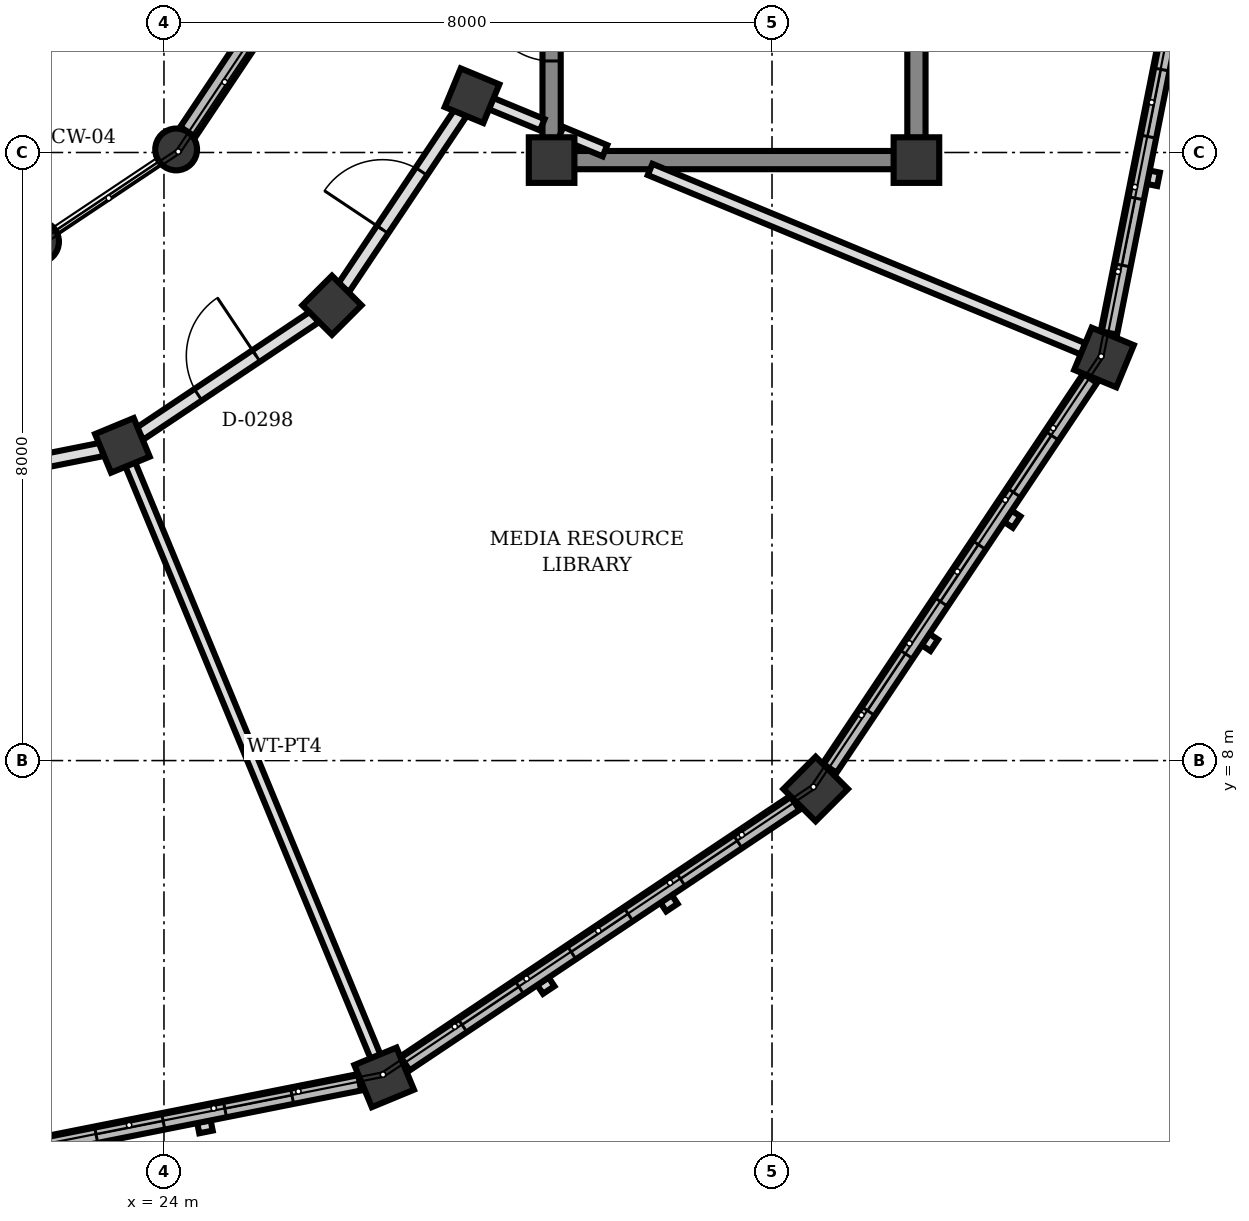
"""IFC4 building model, lengths in metres.
Left out: names, types, materials, properties, quantities, classifications, styles, units other than length and angle.
Written with IfcOpenShell. Run it as: python <this file> out.ifc"""

import sys

from ifc_helpers import new_model, si_unit, direction, frame, frame_2d, origin, origin_2d, place, context, subcontext, project, spatial, rectangle, circle, extrude, element, fill, save


model = new_model("IFC4")
c1 = context("Model", 3, precision=1e-05, world=origin(), true_north=direction((0.0, 1.0)))
c2 = subcontext(c1, "Body", "Model", "MODEL_VIEW")
j1 = project(units=[si_unit("LENGTHUNIT", "METRE"), si_unit("PLANEANGLEUNIT", "RADIAN")], contexts=[c1])
p1 = place(None, origin())
s1 = spatial("IfcSite", under=j1, at=p1, CompositionType="ELEMENT")
p2 = place(p1, origin())
s2 = spatial("IfcBuilding", under=s1, at=p2, CompositionType="ELEMENT")
p3 = place(p2, frame((0.0, 0.0, 4.5)))
s3 = spatial("IfcBuildingStorey", under=s2, at=p3, CompositionType="ELEMENT", Elevation=4.5)
for number, where, z_axis, x_axis in (
    (1, (29.1, 15.9, 0.0), (0.0, 0.0, 1.0), (1.0, 0.0, 0.0)),
    (2, (33.9, 15.9, 0.0), (0.0, 0.0, 1.0), (1.0, 0.0, 0.0)),
):
    element("IfcColumn", number, at=place(p3, frame(where, z_axis=z_axis, x_axis=x_axis)), inside=s3, PredefinedType="COLUMN", context=c2, shape_type="SweptSolid", body=[
        extrude(rectangle(XDim=0.6, YDim=0.6, at=origin_2d()), origin(), (0.0, 0.0, 1.0), 4.0),
    ])
for number, where, z_axis, x_axis in (
    (3, (22.343, 14.826, 0.0), (0.0, 0.0, 1.0), (1.0, 0.0, 0.0)),
    (4, (24.16, 16.04, 0.0), (0.0, 0.0, 1.0), (1.0, 0.0, 0.0)),
):
    element("IfcColumn", number, at=place(p3, frame(where, z_axis=z_axis, x_axis=x_axis)), inside=s3, PredefinedType="COLUMN", context=c2, shape_type="SweptSolid", body=[
        extrude(circle(Radius=0.275, at=origin_2d()), origin(), (0.0, 0.0, 1.0), 4.0),
    ])
for number, where, z_axis, x_axis in (
    (5, (23.453, 12.147, 0.0), (0.0, 0.0, 1.0), (0.383, -0.924, 0.0)),
    (6, (26.21, 13.99, 0.0), (0.0, 0.0, 1.0), (0.707, -0.707, 0.0)),
    (7, (28.053, 16.747, 0.0), (0.0, 0.0, 1.0), (0.924, -0.383, 0.0)),
):
    element("IfcColumn", number, at=place(p3, frame(where, z_axis=z_axis, x_axis=x_axis)), inside=s3, PredefinedType="COLUMN", context=c2, shape_type="SweptSolid", body=[
        extrude(rectangle(XDim=0.55, YDim=0.55, at=origin_2d()), origin(), (0.0, 0.0, 1.0), 4.0),
    ])
for number, where, z_axis, x_axis in (
    (8, (26.897, 3.832, 0.0), (0.0, 0.0, 1.0), (0.383, -0.924, 0.0)),
    (9, (32.574, 7.626, 0.0), (0.0, 0.0, 1.0), (0.707, -0.707, 0.0)),
    (10, (36.368, 13.303, 0.0), (0.0, 0.0, 1.0), (0.924, -0.383, 0.0)),
):
    element("IfcColumn", number, at=place(p3, frame(where, z_axis=z_axis, x_axis=x_axis)), inside=s3, PredefinedType="COLUMN", context=c2, shape_type="SweptSolid", body=[
        extrude(rectangle(XDim=0.6, YDim=0.6, at=origin_2d()), origin(), (0.0, 0.0, 1.0), 4.0),
    ])
p4 = place(p3, frame((26.574, 3.768, 0.0), z_axis=(0.0, 0.0, 1.0), x_axis=(-0.980770460131, -0.195164813773, 0.0)))
e11 = element("IfcWall", 11, at=p4, inside=s3, PredefinedType="SOLIDWALL", context=c2, shape_type="SweptSolid", body=[
    extrude(rectangle(XDim=6.17, YDim=0.22, at=frame_2d((3.085, 0.0))), origin(), (0.0, 0.0, 1.0), 3.172),
])
p5 = place(p4, frame((0.907, 0.0, 0.85)))
e12 = element("IfcOpeningElement", 12, at=p5, cuts=e11, PredefinedType="OPENING", context=c2, shape_type="SweptSolid", body=[
    extrude(rectangle(XDim=0.9, YDim=1.4, at=frame_2d((0.45, 0.7))), frame((0.0, 0.12, 0.0), z_axis=(0.0, -1.0, 0.0), x_axis=(1.0, 0.0, 0.0)), (0.0, 0.0, 1.0), 0.24),
])
p6 = place(p4, frame((2.635, 0.0, 0.85)))
e13 = element("IfcOpeningElement", 13, at=p6, cuts=e11, PredefinedType="OPENING", context=c2, shape_type="SweptSolid", body=[
    extrude(rectangle(XDim=0.9, YDim=1.4, at=frame_2d((0.45, 0.7))), frame((0.0, 0.12, 0.0), z_axis=(0.0, -1.0, 0.0), x_axis=(1.0, 0.0, 0.0)), (0.0, 0.0, 1.0), 0.24),
])
p7 = place(p4, frame((4.362, 0.0, 0.85)))
e14 = element("IfcOpeningElement", 14, at=p7, cuts=e11, PredefinedType="OPENING", context=c2, shape_type="SweptSolid", body=[
    extrude(rectangle(XDim=0.9, YDim=1.4, at=frame_2d((0.45, 0.7))), frame((0.0, 0.12, 0.0), z_axis=(0.0, -1.0, 0.0), x_axis=(1.0, 0.0, 0.0)), (0.0, 0.0, 1.0), 0.24),
])
p8 = place(p3, frame((32.3, 7.443, 0.0), z_axis=(0.0, 0.0, 1.0), x_axis=(-0.831392186772, -0.55568609104, 0.0)))
e15 = element("IfcWall", 15, at=p8, inside=s3, PredefinedType="SOLIDWALL", context=c2, shape_type="SweptSolid", body=[
    extrude(rectangle(XDim=6.169, YDim=0.22, at=frame_2d((3.085, 0.0))), origin(), (0.0, 0.0, 1.0), 3.172),
])
p9 = place(p8, frame((0.907, 0.0, 0.85)))
e16 = element("IfcOpeningElement", 16, at=p9, cuts=e15, PredefinedType="OPENING", context=c2, shape_type="SweptSolid", body=[
    extrude(rectangle(XDim=0.9, YDim=1.4, at=frame_2d((0.45, 0.7))), frame((0.0, 0.12, 0.0), z_axis=(0.0, -1.0, 0.0), x_axis=(1.0, 0.0, 0.0)), (0.0, 0.0, 1.0), 0.24),
])
p10 = place(p8, frame((2.635, 0.0, 0.85)))
e17 = element("IfcOpeningElement", 17, at=p10, cuts=e15, PredefinedType="OPENING", context=c2, shape_type="SweptSolid", body=[
    extrude(rectangle(XDim=0.9, YDim=1.4, at=frame_2d((0.45, 0.7))), frame((0.0, 0.12, 0.0), z_axis=(0.0, -1.0, 0.0), x_axis=(1.0, 0.0, 0.0)), (0.0, 0.0, 1.0), 0.24),
])
p11 = place(p8, frame((4.362, 0.0, 0.85)))
e18 = element("IfcOpeningElement", 18, at=p11, cuts=e15, PredefinedType="OPENING", context=c2, shape_type="SweptSolid", body=[
    extrude(rectangle(XDim=0.9, YDim=1.4, at=frame_2d((0.45, 0.7))), frame((0.0, 0.12, 0.0), z_axis=(0.0, -1.0, 0.0), x_axis=(1.0, 0.0, 0.0)), (0.0, 0.0, 1.0), 0.24),
])
p12 = place(p3, frame((36.185, 13.029, 0.0), z_axis=(0.0, 0.0, 1.0), x_axis=(-0.555658736667, -0.831410469242, 0.0)))
e19 = element("IfcWall", 19, at=p12, inside=s3, PredefinedType="SOLIDWALL", context=c2, shape_type="SweptSolid", body=[
    extrude(rectangle(XDim=6.169, YDim=0.22, at=frame_2d((3.084, 0.0))), origin(), (0.0, 0.0, 1.0), 3.172),
])
p13 = place(p12, frame((0.907, 0.0, 0.85)))
e20 = element("IfcOpeningElement", 20, at=p13, cuts=e19, PredefinedType="OPENING", context=c2, shape_type="SweptSolid", body=[
    extrude(rectangle(XDim=0.9, YDim=1.4, at=frame_2d((0.45, 0.7))), frame((0.0, 0.12, 0.0), z_axis=(0.0, -1.0, 0.0), x_axis=(1.0, 0.0, 0.0)), (0.0, 0.0, 1.0), 0.24),
])
p14 = place(p12, frame((2.635, 0.0, 0.85)))
e21 = element("IfcOpeningElement", 21, at=p14, cuts=e19, PredefinedType="OPENING", context=c2, shape_type="SweptSolid", body=[
    extrude(rectangle(XDim=0.9, YDim=1.4, at=frame_2d((0.45, 0.7))), frame((0.0, 0.12, 0.0), z_axis=(0.0, -1.0, 0.0), x_axis=(1.0, 0.0, 0.0)), (0.0, 0.0, 1.0), 0.24),
])
p15 = place(p12, frame((4.362, 0.0, 0.85)))
e22 = element("IfcOpeningElement", 22, at=p15, cuts=e19, PredefinedType="OPENING", context=c2, shape_type="SweptSolid", body=[
    extrude(rectangle(XDim=0.9, YDim=1.4, at=frame_2d((0.45, 0.7))), frame((0.0, 0.12, 0.0), z_axis=(0.0, -1.0, 0.0), x_axis=(1.0, 0.0, 0.0)), (0.0, 0.0, 1.0), 0.24),
])
p16 = place(p3, frame((24.314, 16.27, 0.0), z_axis=(0.0, 0.0, 1.0), x_axis=(0.555287078904, 0.83165874011, 0.0)))
e23 = element("IfcWall", 23, at=p16, inside=s3, PredefinedType="SOLIDWALL", context=c2, shape_type="SweptSolid", body=[
    extrude(rectangle(XDim=1.632, YDim=0.24, at=frame_2d((0.816, 0.0))), origin(), (0.0, 0.0, 1.0), 3.222),
])
p17 = place(p3, frame((37.636, 19.677, 0.0), z_axis=(0.0, 0.0, 1.0), x_axis=(-0.195164813773, -0.980770460131, 0.0)))
e24 = element("IfcWall", 24, at=p17, inside=s3, PredefinedType="SOLIDWALL", context=c2, shape_type="SweptSolid", body=[
    extrude(rectangle(XDim=6.17, YDim=0.22, at=frame_2d((3.085, 0.0))), origin(), (0.0, 0.0, 1.0), 3.172),
])
p18 = place(p17, frame((0.907, 0.0, 0.85)))
e25 = element("IfcOpeningElement", 25, at=p18, cuts=e24, PredefinedType="OPENING", context=c2, shape_type="SweptSolid", body=[
    extrude(rectangle(XDim=0.9, YDim=1.4, at=frame_2d((0.45, 0.7))), frame((0.0, 0.12, 0.0), z_axis=(0.0, -1.0, 0.0), x_axis=(1.0, 0.0, 0.0)), (0.0, 0.0, 1.0), 0.24),
])
p19 = place(p17, frame((2.635, 0.0, 0.85)))
e26 = element("IfcOpeningElement", 26, at=p19, cuts=e24, PredefinedType="OPENING", context=c2, shape_type="SweptSolid", body=[
    extrude(rectangle(XDim=0.9, YDim=1.4, at=frame_2d((0.45, 0.7))), frame((0.0, 0.12, 0.0), z_axis=(0.0, -1.0, 0.0), x_axis=(1.0, 0.0, 0.0)), (0.0, 0.0, 1.0), 0.24),
])
p20 = place(p17, frame((4.362, 0.0, 0.85)))
e27 = element("IfcOpeningElement", 27, at=p20, cuts=e24, PredefinedType="OPENING", context=c2, shape_type="SweptSolid", body=[
    extrude(rectangle(XDim=0.9, YDim=1.4, at=frame_2d((0.45, 0.7))), frame((0.0, 0.12, 0.0), z_axis=(0.0, -1.0, 0.0), x_axis=(1.0, 0.0, 0.0)), (0.0, 0.0, 1.0), 0.24),
])
p21 = place(p3, frame((29.1, 16.192, 0.0), z_axis=(0.0, 0.0, 1.0), x_axis=(0.0, 1.0, 0.0)))
e28 = element("IfcWall", 28, at=p21, inside=s3, PredefinedType="SHEAR", context=c2, shape_type="SweptSolid", body=[
    extrude(rectangle(XDim=8.136, YDim=0.24, at=frame_2d((4.068, 0.0))), origin(), (0.0, 0.0, 1.0), 3.74),
])
p22 = place(p21, frame((1.012, 0.0, 0.0)))
e29 = element("IfcOpeningElement", 29, at=p22, cuts=e28, PredefinedType="OPENING", context=c2, shape_type="SweptSolid", body=[
    extrude(rectangle(XDim=0.88, YDim=2.1, at=frame_2d((0.44, 1.05))), frame((0.0, 0.13, 0.0), z_axis=(0.0, -1.0, 0.0), x_axis=(1.0, 0.0, 0.0)), (0.0, 0.0, 1.0), 0.26),
])
p23 = place(p3, frame((33.9, 24.328, 0.0), z_axis=(0.0, 0.0, 1.0), x_axis=(0.0, -1.0, 0.0)))
e30 = element("IfcWall", 30, at=p23, inside=s3, PredefinedType="SHEAR", context=c2, shape_type="SweptSolid", body=[
    extrude(rectangle(XDim=8.136, YDim=0.24, at=frame_2d((4.068, 0.0))), origin(), (0.0, 0.0, 1.0), 3.74),
])
p24 = place(p3, frame((33.608, 15.9, 0.0), z_axis=(0.0, 0.0, 1.0), x_axis=(-1.0, 0.0, 0.0)))
e31 = element("IfcWall", 31, at=p24, inside=s3, PredefinedType="SHEAR", context=c2, shape_type="SweptSolid", body=[
    extrude(rectangle(XDim=4.216, YDim=0.24, at=frame_2d((2.108, 0.0))), origin(), (0.0, 0.0, 1.0), 3.74),
])
p25 = place(p3, frame((23.555, 11.9, 0.0), z_axis=(0.0, 0.0, 1.0), x_axis=(0.382683896966, -0.923879340067, 0.0)))
e32 = element("IfcWall", 32, at=p25, inside=s3, PredefinedType="PARTITIONING", context=c2, shape_type="SweptSolid", body=[
    extrude(rectangle(XDim=8.44, YDim=0.14, at=frame_2d((4.22, 0.0))), origin(), (0.0, 0.0, 1.0), 3.072),
])
p26 = place(p3, frame((28.3, 16.645, 0.0), z_axis=(0.0, 0.0, 1.0), x_axis=(0.924069600435, -0.382224245113, 0.0)))
e33 = element("IfcWall", 33, at=p26, inside=s3, PredefinedType="PARTITIONING", context=c2, shape_type="SweptSolid", body=[
    extrude(rectangle(XDim=0.733, YDim=0.16, at=frame_2d((0.366, 0.0))), origin(), (0.0, 0.0, 1.0), 3.072),
])
p27 = place(p3, frame((29.223, 16.263, 0.0), z_axis=(0.0, 0.0, 1.0), x_axis=(0.923812676193, -0.382844797933, 0.0)))
e34 = element("IfcWall", 34, at=p27, inside=s3, PredefinedType="PARTITIONING", context=c2, shape_type="SweptSolid", body=[
    extrude(rectangle(XDim=0.627, YDim=0.16, at=frame_2d((0.313, 0.0))), origin(), (0.0, 0.0, 1.0), 3.072),
])
p28 = place(p3, frame((30.396, 15.777, 0.0), z_axis=(0.0, 0.0, 1.0), x_axis=(0.923864955254, -0.382718623082, 0.0)))
e35 = element("IfcWall", 35, at=p28, inside=s3, PredefinedType="PARTITIONING", context=c2, shape_type="SweptSolid", body=[
    extrude(rectangle(XDim=6.172, YDim=0.16, at=frame_2d((3.086, 0.0))), origin(), (0.0, 0.0, 1.0), 3.072),
])
p29 = place(p3, frame((20.467, 11.553, 0.0), z_axis=(0.0, 0.0, 1.0), x_axis=(0.980773264811, 0.195150718759, 0.0)))
e36 = element("IfcWall", 36, at=p29, inside=s3, PredefinedType="PARTITIONING", context=c2, shape_type="SweptSolid", body=[
    extrude(rectangle(XDim=2.772, YDim=0.18, at=frame_2d((1.386, 0.0))), origin(), (0.0, 0.0, 1.0), 3.072),
])
p30 = place(p29, frame((0.926, 0.0, 0.0)))
e37 = element("IfcOpeningElement", 37, at=p30, cuts=e36, PredefinedType="OPENING", context=c2, shape_type="SweptSolid", body=[
    extrude(rectangle(XDim=0.92, YDim=2.1, at=frame_2d((0.46, 1.05))), frame((0.0, 0.1, 0.0), z_axis=(0.0, -1.0, 0.0), x_axis=(1.0, 0.0, 0.0)), (0.0, 0.0, 1.0), 0.2),
])
p31 = place(p3, frame((23.679, 12.298, 0.0), z_axis=(0.0, 0.0, 1.0), x_axis=(0.831318045056, 0.555797002478, 0.0)))
e38 = element("IfcWall", 38, at=p31, inside=s3, PredefinedType="PARTITIONING", context=c2, shape_type="SweptSolid", body=[
    extrude(rectangle(XDim=2.773, YDim=0.18, at=frame_2d((1.386, 0.0))), origin(), (0.0, 0.0, 1.0), 3.072),
])
p32 = place(p31, frame((0.926, 0.0, 0.0)))
e39 = element("IfcOpeningElement", 39, at=p32, cuts=e38, PredefinedType="OPENING", context=c2, shape_type="SweptSolid", body=[
    extrude(rectangle(XDim=0.92, YDim=2.1, at=frame_2d((0.46, 1.05))), frame((0.0, 0.1, 0.0), z_axis=(0.0, -1.0, 0.0), x_axis=(1.0, 0.0, 0.0)), (0.0, 0.0, 1.0), 0.2),
])
p33 = place(p3, frame((26.361, 14.216, 0.0), z_axis=(0.0, 0.0, 1.0), x_axis=(0.555797002478, 0.831318045056, 0.0)))
e40 = element("IfcWall", 40, at=p33, inside=s3, PredefinedType="PARTITIONING", context=c2, shape_type="SweptSolid", body=[
    extrude(rectangle(XDim=2.773, YDim=0.18, at=frame_2d((1.386, 0.0))), origin(), (0.0, 0.0, 1.0), 3.072),
])
p34 = place(p33, frame((0.926, 0.0, 0.0)))
e41 = element("IfcOpeningElement", 41, at=p34, cuts=e40, PredefinedType="OPENING", context=c2, shape_type="SweptSolid", body=[
    extrude(rectangle(XDim=0.92, YDim=2.1, at=frame_2d((0.46, 1.05))), frame((0.0, 0.1, 0.0), z_axis=(0.0, -1.0, 0.0), x_axis=(1.0, 0.0, 0.0)), (0.0, 0.0, 1.0), 0.2),
])
p35 = place(p5, origin())
e42 = element("IfcWindow", 42, at=p35, inside=s3, PartitioningType="SINGLE_PANEL", PredefinedType="WINDOW", context=c2, shape_type="SweptSolid", body=[
    extrude(rectangle(XDim=0.9, YDim=1.4, at=frame_2d((0.45, 0.7))), frame((0.0, 0.03, 0.0), z_axis=(0.0, -1.0, 0.0), x_axis=(1.0, 0.0, 0.0)), (0.0, 0.0, 1.0), 0.06),
])
fill(e12, e42)
p36 = place(p6, origin())
e43 = element("IfcWindow", 43, at=p36, inside=s3, PartitioningType="SINGLE_PANEL", PredefinedType="WINDOW", context=c2, shape_type="SweptSolid", body=[
    extrude(rectangle(XDim=0.9, YDim=1.4, at=frame_2d((0.45, 0.7))), frame((0.0, 0.03, 0.0), z_axis=(0.0, -1.0, 0.0), x_axis=(1.0, 0.0, 0.0)), (0.0, 0.0, 1.0), 0.06),
])
fill(e13, e43)
p37 = place(p9, origin())
e44 = element("IfcWindow", 44, at=p37, inside=s3, PartitioningType="SINGLE_PANEL", PredefinedType="WINDOW", context=c2, shape_type="SweptSolid", body=[
    extrude(rectangle(XDim=0.9, YDim=1.4, at=frame_2d((0.45, 0.7))), frame((0.0, 0.03, 0.0), z_axis=(0.0, -1.0, 0.0), x_axis=(1.0, 0.0, 0.0)), (0.0, 0.0, 1.0), 0.06),
])
fill(e16, e44)
p38 = place(p10, origin())
e45 = element("IfcWindow", 45, at=p38, inside=s3, PartitioningType="SINGLE_PANEL", PredefinedType="WINDOW", context=c2, shape_type="SweptSolid", body=[
    extrude(rectangle(XDim=0.9, YDim=1.4, at=frame_2d((0.45, 0.7))), frame((0.0, 0.03, 0.0), z_axis=(0.0, -1.0, 0.0), x_axis=(1.0, 0.0, 0.0)), (0.0, 0.0, 1.0), 0.06),
])
fill(e17, e45)
p39 = place(p11, origin())
e46 = element("IfcWindow", 46, at=p39, inside=s3, PartitioningType="SINGLE_PANEL", PredefinedType="WINDOW", context=c2, shape_type="SweptSolid", body=[
    extrude(rectangle(XDim=0.9, YDim=1.4, at=frame_2d((0.45, 0.7))), frame((0.0, 0.03, 0.0), z_axis=(0.0, -1.0, 0.0), x_axis=(1.0, 0.0, 0.0)), (0.0, 0.0, 1.0), 0.06),
])
fill(e18, e46)
p40 = place(p13, origin())
e47 = element("IfcWindow", 47, at=p40, inside=s3, PartitioningType="SINGLE_PANEL", PredefinedType="WINDOW", context=c2, shape_type="SweptSolid", body=[
    extrude(rectangle(XDim=0.9, YDim=1.4, at=frame_2d((0.45, 0.7))), frame((0.0, 0.03, 0.0), z_axis=(0.0, -1.0, 0.0), x_axis=(1.0, 0.0, 0.0)), (0.0, 0.0, 1.0), 0.06),
])
fill(e20, e47)
p41 = place(p14, origin())
e48 = element("IfcWindow", 48, at=p41, inside=s3, PartitioningType="SINGLE_PANEL", PredefinedType="WINDOW", context=c2, shape_type="SweptSolid", body=[
    extrude(rectangle(XDim=0.9, YDim=1.4, at=frame_2d((0.45, 0.7))), frame((0.0, 0.03, 0.0), z_axis=(0.0, -1.0, 0.0), x_axis=(1.0, 0.0, 0.0)), (0.0, 0.0, 1.0), 0.06),
])
fill(e21, e48)
p42 = place(p15, origin())
e49 = element("IfcWindow", 49, at=p42, inside=s3, PartitioningType="SINGLE_PANEL", PredefinedType="WINDOW", context=c2, shape_type="SweptSolid", body=[
    extrude(rectangle(XDim=0.9, YDim=1.4, at=frame_2d((0.45, 0.7))), frame((0.0, 0.03, 0.0), z_axis=(0.0, -1.0, 0.0), x_axis=(1.0, 0.0, 0.0)), (0.0, 0.0, 1.0), 0.06),
])
fill(e22, e49)
p43 = place(p19, origin())
e50 = element("IfcWindow", 50, at=p43, inside=s3, PartitioningType="SINGLE_PANEL", PredefinedType="WINDOW", context=c2, shape_type="SweptSolid", body=[
    extrude(rectangle(XDim=0.9, YDim=1.4, at=frame_2d((0.45, 0.7))), frame((0.0, 0.03, 0.0), z_axis=(0.0, -1.0, 0.0), x_axis=(1.0, 0.0, 0.0)), (0.0, 0.0, 1.0), 0.06),
])
fill(e26, e50)
p44 = place(p20, origin())
e51 = element("IfcWindow", 51, at=p44, inside=s3, PartitioningType="SINGLE_PANEL", PredefinedType="WINDOW", context=c2, shape_type="SweptSolid", body=[
    extrude(rectangle(XDim=0.9, YDim=1.4, at=frame_2d((0.45, 0.7))), frame((0.0, 0.03, 0.0), z_axis=(0.0, -1.0, 0.0), x_axis=(1.0, 0.0, 0.0)), (0.0, 0.0, 1.0), 0.06),
])
fill(e27, e51)
p45 = place(p22, origin())
e52 = element("IfcDoor", 52, at=p45, inside=s3, OperationType="SINGLE_SWING_RIGHT", PredefinedType="DOOR", context=c2, shape_type="SweptSolid", body=[
    extrude(rectangle(XDim=0.88, YDim=2.1, at=frame_2d((0.44, 1.05))), frame((0.0, 0.025, 0.0), z_axis=(0.0, -1.0, 0.0), x_axis=(1.0, 0.0, 0.0)), (0.0, 0.0, 1.0), 0.05),
])
fill(e29, e52)
p46 = place(p32, origin())
e53 = element("IfcDoor", 53, at=p46, inside=s3, OperationType="SINGLE_SWING_RIGHT", PredefinedType="DOOR", context=c2, shape_type="SweptSolid", body=[
    extrude(rectangle(XDim=0.92, YDim=2.1, at=frame_2d((0.46, 1.05))), frame((0.0, 0.025, 0.0), z_axis=(0.0, -1.0, 0.0), x_axis=(1.0, 0.0, 0.0)), (0.0, 0.0, 1.0), 0.05),
])
fill(e39, e53)
p47 = place(p34, origin())
e54 = element("IfcDoor", 54, at=p47, inside=s3, OperationType="SINGLE_SWING_LEFT", PredefinedType="DOOR", context=c2, shape_type="SweptSolid", body=[
    extrude(rectangle(XDim=0.92, YDim=2.1, at=frame_2d((0.46, 1.05))), frame((0.0, 0.025, 0.0), z_axis=(0.0, -1.0, 0.0), x_axis=(1.0, 0.0, 0.0)), (0.0, 0.0, 1.0), 0.05),
])
fill(e41, e54)
save(model, sys.argv[1])
